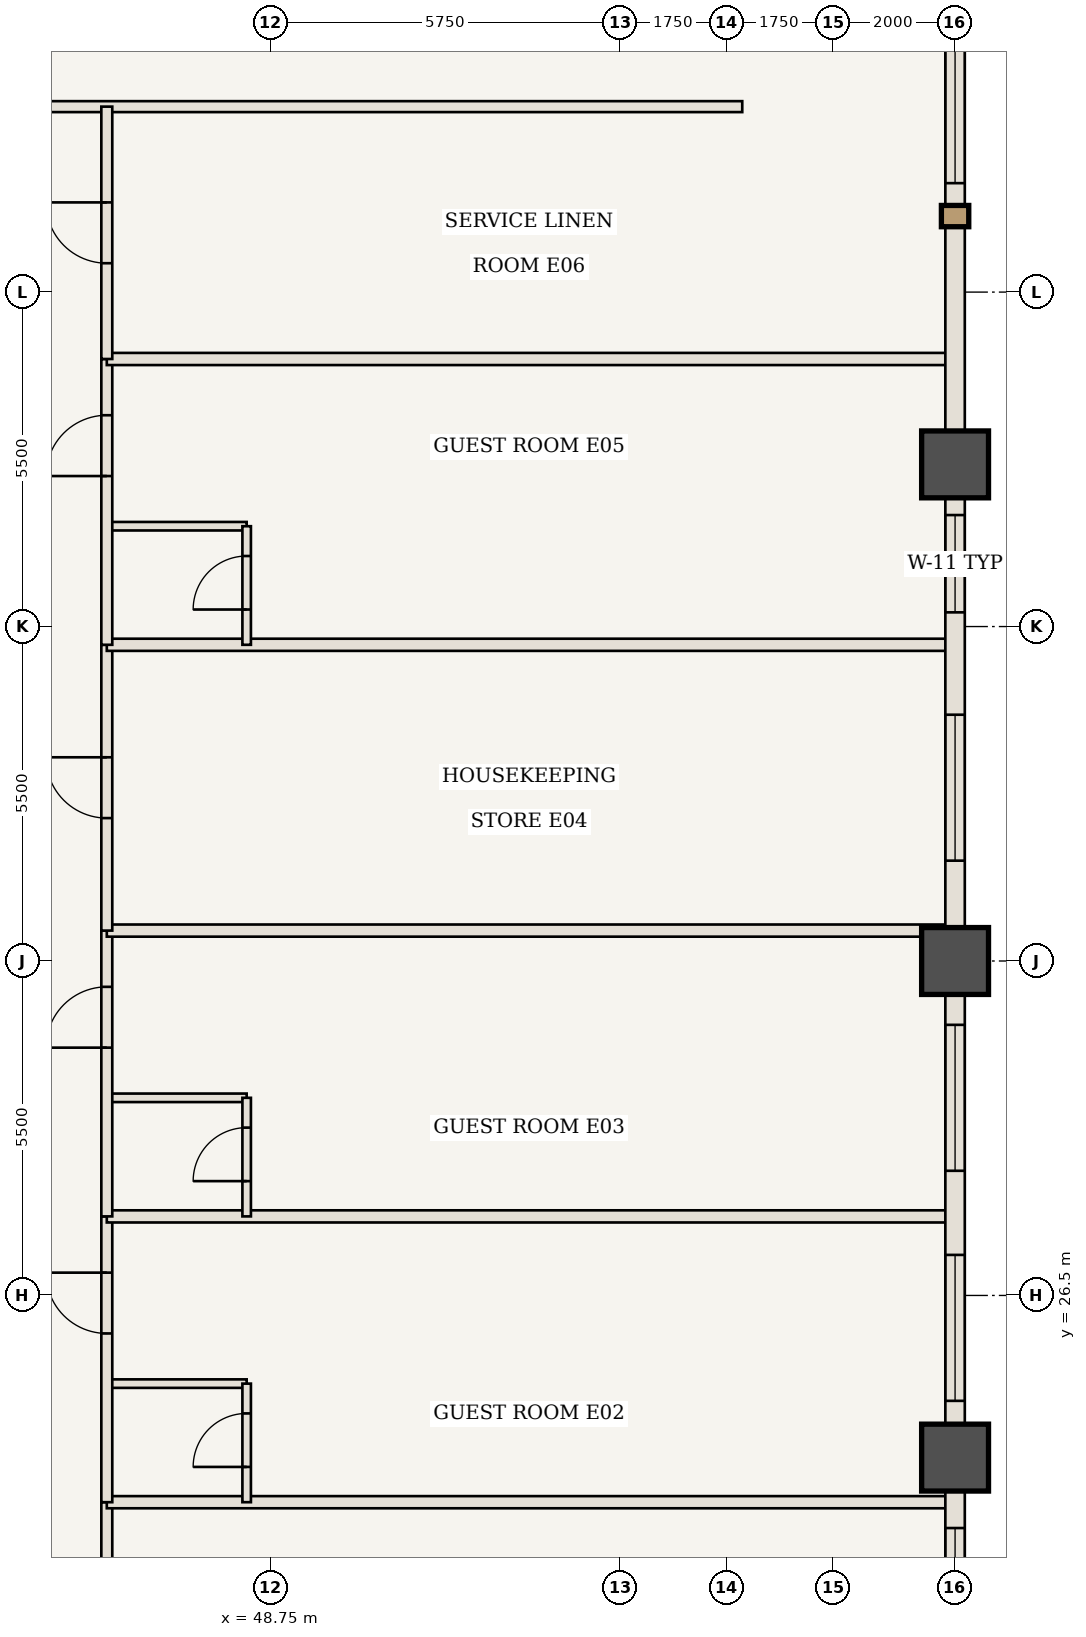
"""IFC4 building model, lengths in metres.
Left out: names, types, materials, properties, quantities, classifications, styles, units other than length and angle.
Written with IfcOpenShell. Run it as: python <this file> out.ifc"""

import sys

from ifc_helpers import new_model, si_unit, direction, frame, frame_2d, origin, origin_2d, place, context, subcontext, project, spatial, rectangle, extrude, element, fill, save


model = new_model("IFC4")
c1 = context("Model", 3, precision=1e-05, world=origin(), true_north=direction((0.0, 1.0)))
c2 = subcontext(c1, "Body", "Model", "MODEL_VIEW")
j1 = project(units=[si_unit("LENGTHUNIT", "METRE"), si_unit("PLANEANGLEUNIT", "RADIAN")], contexts=[c1])
p1 = place(None, origin())
s1 = spatial("IfcSite", under=j1, at=p1, CompositionType="ELEMENT")
p2 = place(p1, origin())
s2 = spatial("IfcBuilding", under=s1, at=p2, CompositionType="ELEMENT")
p3 = place(p2, frame((0.0, 0.0, 73.85)))
s3 = spatial("IfcBuildingStorey", under=s2, at=p3, CompositionType="ELEMENT", Elevation=73.85)
for number, where, z_axis, x_axis in (
    (1, (60.0, 23.833, 0.0), (0.0, 0.0, 1.0), (1.0, 0.0, 0.0)),
    (2, (60.0, 32.0, 0.0), (0.0, 0.0, 1.0), (1.0, 0.0, 0.0)),
    (3, (60.0, 40.167, 0.0), (0.0, 0.0, 1.0), (1.0, 0.0, 0.0)),
):
    element("IfcColumn", number, at=place(p3, frame(where, z_axis=z_axis, x_axis=x_axis)), inside=s3, PredefinedType="COLUMN", context=c2, shape_type="SweptSolid", body=[
        extrude(rectangle(XDim=1.1, YDim=1.1, at=origin_2d()), origin(), (0.0, 0.0, 1.0), 3.5),
    ])
p4 = place(p3, frame((33.8, 46.05, 0.0), z_axis=(0.0, 0.0, 1.0), x_axis=(1.0, 0.0, 0.0)))
e4 = element("IfcWall", 4, at=p4, inside=s3, PredefinedType="STANDARD", context=c2, shape_type="SweptSolid", body=[
    extrude(rectangle(XDim=22.7, YDim=0.18, at=frame_2d((11.35, 0.0))), origin(), (0.0, 0.0, 1.0), 3.24),
])
p5 = place(p4, frame((5.6, 0.0, 0.0)))
e5 = element("IfcOpeningElement", 5, at=p5, cuts=e4, PredefinedType="OPENING", context=c2, shape_type="SweptSolid", body=[
    extrude(rectangle(XDim=1.0, YDim=2.15, at=frame_2d((0.5, 1.075))), frame((0.0, 0.1, 0.0), z_axis=(0.0, -1.0, 0.0), x_axis=(1.0, 0.0, 0.0)), (0.0, 0.0, 1.0), 0.2),
])
p6 = place(p3, frame((46.05, 17.95, 0.0), z_axis=(0.0, 0.0, 1.0), x_axis=(0.0, 1.0, 0.0)))
e6 = element("IfcWall", 6, at=p6, inside=s3, PredefinedType="STANDARD", context=c2, shape_type="SweptSolid", body=[
    extrude(rectangle(XDim=5.15, YDim=0.18, at=frame_2d((2.575, 0.0))), origin(), (0.0, 0.0, 1.0), 3.24),
])
p7 = place(p6, frame((3.0, 0.0, 0.0)))
e7 = element("IfcOpeningElement", 7, at=p7, cuts=e6, PredefinedType="OPENING", context=c2, shape_type="SweptSolid", body=[
    extrude(rectangle(XDim=1.0, YDim=2.15, at=frame_2d((0.5, 1.075))), frame((0.0, 0.1, 0.0), z_axis=(0.0, -1.0, 0.0), x_axis=(1.0, 0.0, 0.0)), (0.0, 0.0, 1.0), 0.2),
])
p8 = place(p3, frame((46.05, 23.1, 0.0), z_axis=(0.0, 0.0, 1.0), x_axis=(1.0, 0.0, 0.0)))
e8 = element("IfcWall", 8, at=p8, inside=s3, PredefinedType="STANDARD", context=c2, shape_type="SweptSolid", body=[
    extrude(rectangle(XDim=13.89, YDim=0.2, at=frame_2d((6.945, 0.0))), origin(), (0.0, 0.0, 1.0), 3.24),
])
p9 = place(p3, frame((46.05, 25.05, 0.0), z_axis=(0.0, 0.0, 1.0), x_axis=(1.0, 0.0, 0.0)))
e9 = element("IfcWall", 9, at=p9, inside=s3, PredefinedType="STANDARD", context=c2, shape_type="SweptSolid", body=[
    extrude(rectangle(XDim=2.3, YDim=0.14, at=frame_2d((1.15, 0.0))), origin(), (0.0, 0.0, 1.0), 3.24),
])
p10 = place(p3, frame((48.35, 23.1, 0.0), z_axis=(0.0, 0.0, 1.0), x_axis=(0.0, 1.0, 0.0)))
e10 = element("IfcWall", 10, at=p10, inside=s3, PredefinedType="STANDARD", context=c2, shape_type="SweptSolid", body=[
    extrude(rectangle(XDim=1.95, YDim=0.14, at=frame_2d((0.975, 0.0))), origin(), (0.0, 0.0, 1.0), 3.24),
])
p11 = place(p10, frame((0.58, 0.0, 0.0)))
e11 = element("IfcOpeningElement", 11, at=p11, cuts=e10, PredefinedType="OPENING", context=c2, shape_type="SweptSolid", body=[
    extrude(rectangle(XDim=0.88, YDim=2.1, at=frame_2d((0.44, 1.05))), frame((0.0, 0.08, 0.0), z_axis=(0.0, -1.0, 0.0), x_axis=(1.0, 0.0, 0.0)), (0.0, 0.0, 1.0), 0.16),
])
p12 = place(p3, frame((46.05, 23.1, 0.0), z_axis=(0.0, 0.0, 1.0), x_axis=(0.0, 1.0, 0.0)))
e12 = element("IfcWall", 12, at=p12, inside=s3, PredefinedType="STANDARD", context=c2, shape_type="SweptSolid", body=[
    extrude(rectangle(XDim=4.7, YDim=0.18, at=frame_2d((2.35, 0.0))), origin(), (0.0, 0.0, 1.0), 3.24),
])
p13 = place(p12, frame((2.775, 0.0, 0.0)))
e13 = element("IfcOpeningElement", 13, at=p13, cuts=e12, PredefinedType="OPENING", context=c2, shape_type="SweptSolid", body=[
    extrude(rectangle(XDim=1.0, YDim=2.15, at=frame_2d((0.5, 1.075))), frame((0.0, 0.1, 0.0), z_axis=(0.0, -1.0, 0.0), x_axis=(1.0, 0.0, 0.0)), (0.0, 0.0, 1.0), 0.2),
])
p14 = place(p3, frame((46.05, 27.8, 0.0), z_axis=(0.0, 0.0, 1.0), x_axis=(1.0, 0.0, 0.0)))
e14 = element("IfcWall", 14, at=p14, inside=s3, PredefinedType="STANDARD", context=c2, shape_type="SweptSolid", body=[
    extrude(rectangle(XDim=13.89, YDim=0.2, at=frame_2d((6.945, 0.0))), origin(), (0.0, 0.0, 1.0), 3.24),
])
p15 = place(p3, frame((46.05, 29.75, 0.0), z_axis=(0.0, 0.0, 1.0), x_axis=(1.0, 0.0, 0.0)))
e15 = element("IfcWall", 15, at=p15, inside=s3, PredefinedType="STANDARD", context=c2, shape_type="SweptSolid", body=[
    extrude(rectangle(XDim=2.3, YDim=0.14, at=frame_2d((1.15, 0.0))), origin(), (0.0, 0.0, 1.0), 3.24),
])
p16 = place(p3, frame((48.35, 27.8, 0.0), z_axis=(0.0, 0.0, 1.0), x_axis=(0.0, 1.0, 0.0)))
e16 = element("IfcWall", 16, at=p16, inside=s3, PredefinedType="STANDARD", context=c2, shape_type="SweptSolid", body=[
    extrude(rectangle(XDim=1.95, YDim=0.14, at=frame_2d((0.975, 0.0))), origin(), (0.0, 0.0, 1.0), 3.24),
])
p17 = place(p16, frame((0.58, 0.0, 0.0)))
e17 = element("IfcOpeningElement", 17, at=p17, cuts=e16, PredefinedType="OPENING", context=c2, shape_type="SweptSolid", body=[
    extrude(rectangle(XDim=0.88, YDim=2.1, at=frame_2d((0.44, 1.05))), frame((0.0, 0.08, 0.0), z_axis=(0.0, -1.0, 0.0), x_axis=(1.0, 0.0, 0.0)), (0.0, 0.0, 1.0), 0.16),
])
p18 = place(p3, frame((46.05, 27.8, 0.0), z_axis=(0.0, 0.0, 1.0), x_axis=(0.0, 1.0, 0.0)))
e18 = element("IfcWall", 18, at=p18, inside=s3, PredefinedType="STANDARD", context=c2, shape_type="SweptSolid", body=[
    extrude(rectangle(XDim=4.7, YDim=0.18, at=frame_2d((2.35, 0.0))), origin(), (0.0, 0.0, 1.0), 3.24),
])
p19 = place(p18, frame((2.775, 0.0, 0.0)))
e19 = element("IfcOpeningElement", 19, at=p19, cuts=e18, PredefinedType="OPENING", context=c2, shape_type="SweptSolid", body=[
    extrude(rectangle(XDim=1.0, YDim=2.15, at=frame_2d((0.5, 1.075))), frame((0.0, 0.1, 0.0), z_axis=(0.0, -1.0, 0.0), x_axis=(1.0, 0.0, 0.0)), (0.0, 0.0, 1.0), 0.2),
])
p20 = place(p3, frame((46.05, 32.5, 0.0), z_axis=(0.0, 0.0, 1.0), x_axis=(1.0, 0.0, 0.0)))
e20 = element("IfcWall", 20, at=p20, inside=s3, PredefinedType="STANDARD", context=c2, shape_type="SweptSolid", body=[
    extrude(rectangle(XDim=13.89, YDim=0.2, at=frame_2d((6.945, 0.0))), origin(), (0.0, 0.0, 1.0), 3.24),
])
p21 = place(p3, frame((46.05, 32.5, 0.0), z_axis=(0.0, 0.0, 1.0), x_axis=(0.0, 1.0, 0.0)))
e21 = element("IfcWall", 21, at=p21, inside=s3, PredefinedType="STANDARD", context=c2, shape_type="SweptSolid", body=[
    extrude(rectangle(XDim=4.7, YDim=0.18, at=frame_2d((2.35, 0.0))), origin(), (0.0, 0.0, 1.0), 3.24),
])
p22 = place(p21, frame((1.85, 0.0, 0.0)))
e22 = element("IfcOpeningElement", 22, at=p22, cuts=e21, PredefinedType="OPENING", context=c2, shape_type="SweptSolid", body=[
    extrude(rectangle(XDim=1.0, YDim=2.15, at=frame_2d((0.5, 1.075))), frame((0.0, 0.1, 0.0), z_axis=(0.0, -1.0, 0.0), x_axis=(1.0, 0.0, 0.0)), (0.0, 0.0, 1.0), 0.2),
])
p23 = place(p3, frame((46.05, 37.2, 0.0), z_axis=(0.0, 0.0, 1.0), x_axis=(1.0, 0.0, 0.0)))
e23 = element("IfcWall", 23, at=p23, inside=s3, PredefinedType="STANDARD", context=c2, shape_type="SweptSolid", body=[
    extrude(rectangle(XDim=13.89, YDim=0.2, at=frame_2d((6.945, 0.0))), origin(), (0.0, 0.0, 1.0), 3.24),
])
p24 = place(p3, frame((46.05, 39.15, 0.0), z_axis=(0.0, 0.0, 1.0), x_axis=(1.0, 0.0, 0.0)))
e24 = element("IfcWall", 24, at=p24, inside=s3, PredefinedType="STANDARD", context=c2, shape_type="SweptSolid", body=[
    extrude(rectangle(XDim=2.3, YDim=0.14, at=frame_2d((1.15, 0.0))), origin(), (0.0, 0.0, 1.0), 3.24),
])
p25 = place(p3, frame((48.35, 37.2, 0.0), z_axis=(0.0, 0.0, 1.0), x_axis=(0.0, 1.0, 0.0)))
e25 = element("IfcWall", 25, at=p25, inside=s3, PredefinedType="STANDARD", context=c2, shape_type="SweptSolid", body=[
    extrude(rectangle(XDim=1.95, YDim=0.14, at=frame_2d((0.975, 0.0))), origin(), (0.0, 0.0, 1.0), 3.24),
])
p26 = place(p25, frame((0.58, 0.0, 0.0)))
e26 = element("IfcOpeningElement", 26, at=p26, cuts=e25, PredefinedType="OPENING", context=c2, shape_type="SweptSolid", body=[
    extrude(rectangle(XDim=0.88, YDim=2.1, at=frame_2d((0.44, 1.05))), frame((0.0, 0.08, 0.0), z_axis=(0.0, -1.0, 0.0), x_axis=(1.0, 0.0, 0.0)), (0.0, 0.0, 1.0), 0.16),
])
p27 = place(p3, frame((46.05, 37.2, 0.0), z_axis=(0.0, 0.0, 1.0), x_axis=(0.0, 1.0, 0.0)))
e27 = element("IfcWall", 27, at=p27, inside=s3, PredefinedType="STANDARD", context=c2, shape_type="SweptSolid", body=[
    extrude(rectangle(XDim=4.7, YDim=0.18, at=frame_2d((2.35, 0.0))), origin(), (0.0, 0.0, 1.0), 3.24),
])
p28 = place(p27, frame((2.775, 0.0, 0.0)))
e28 = element("IfcOpeningElement", 28, at=p28, cuts=e27, PredefinedType="OPENING", context=c2, shape_type="SweptSolid", body=[
    extrude(rectangle(XDim=1.0, YDim=2.15, at=frame_2d((0.5, 1.075))), frame((0.0, 0.1, 0.0), z_axis=(0.0, -1.0, 0.0), x_axis=(1.0, 0.0, 0.0)), (0.0, 0.0, 1.0), 0.2),
])
p29 = place(p3, frame((46.05, 41.9, 0.0), z_axis=(0.0, 0.0, 1.0), x_axis=(1.0, 0.0, 0.0)))
e29 = element("IfcWall", 29, at=p29, inside=s3, PredefinedType="STANDARD", context=c2, shape_type="SweptSolid", body=[
    extrude(rectangle(XDim=13.89, YDim=0.2, at=frame_2d((6.945, 0.0))), origin(), (0.0, 0.0, 1.0), 3.24),
])
p30 = place(p3, frame((46.05, 41.9, 0.0), z_axis=(0.0, 0.0, 1.0), x_axis=(0.0, 1.0, 0.0)))
e30 = element("IfcWall", 30, at=p30, inside=s3, PredefinedType="STANDARD", context=c2, shape_type="SweptSolid", body=[
    extrude(rectangle(XDim=4.15, YDim=0.18, at=frame_2d((2.075, 0.0))), origin(), (0.0, 0.0, 1.0), 3.24),
])
p31 = place(p30, frame((1.575, 0.0, 0.0)))
e31 = element("IfcOpeningElement", 31, at=p31, cuts=e30, PredefinedType="OPENING", context=c2, shape_type="SweptSolid", body=[
    extrude(rectangle(XDim=1.0, YDim=2.15, at=frame_2d((0.5, 1.075))), frame((0.0, 0.1, 0.0), z_axis=(0.0, -1.0, 0.0), x_axis=(1.0, 0.0, 0.0)), (0.0, 0.0, 1.0), 0.2),
])
p32 = place(p3, frame((60.0, 23.833, 0.0), z_axis=(0.0, 0.0, 1.0), x_axis=(0.0, -1.0, 0.0)))
e32 = element("IfcWall", 32, at=p32, inside=s3, PredefinedType="USERDEFINED", context=c2, shape_type="SweptSolid", body=[
    extrude(rectangle(XDim=8.167, YDim=0.32, at=frame_2d((4.083, 0.0))), origin(), (0.0, 0.0, 1.0), 2.44),
])
p33 = place(p32, frame((1.158, 0.0, 0.85)))
e33 = element("IfcOpeningElement", 33, at=p33, cuts=e32, PredefinedType="OPENING", context=c2, shape_type="SweptSolid", body=[
    extrude(rectangle(XDim=2.4, YDim=1.39, at=frame_2d((1.2, 0.695))), frame((0.0, 0.17, 0.0), z_axis=(0.0, -1.0, 0.0), x_axis=(1.0, 0.0, 0.0)), (0.0, 0.0, 1.0), 0.34),
])
p34 = place(p32, frame((4.625, 0.0, 0.85)))
e34 = element("IfcOpeningElement", 34, at=p34, cuts=e32, PredefinedType="OPENING", context=c2, shape_type="SweptSolid", body=[
    extrude(rectangle(XDim=2.8, YDim=1.39, at=frame_2d((1.4, 0.695))), frame((0.0, 0.17, 0.0), z_axis=(0.0, -1.0, 0.0), x_axis=(1.0, 0.0, 0.0)), (0.0, 0.0, 1.0), 0.34),
])
p35 = place(p3, frame((60.0, 32.0, 0.0), z_axis=(0.0, 0.0, 1.0), x_axis=(0.0, -1.0, 0.0)))
e35 = element("IfcWall", 35, at=p35, inside=s3, PredefinedType="USERDEFINED", context=c2, shape_type="SweptSolid", body=[
    extrude(rectangle(XDim=8.167, YDim=0.32, at=frame_2d((4.083, 0.0))), origin(), (0.0, 0.0, 1.0), 2.44),
])
p36 = place(p35, frame((1.05, 0.0, 0.85)))
e36 = element("IfcOpeningElement", 36, at=p36, cuts=e35, PredefinedType="OPENING", context=c2, shape_type="SweptSolid", body=[
    extrude(rectangle(XDim=2.4, YDim=1.39, at=frame_2d((1.2, 0.695))), frame((0.0, 0.17, 0.0), z_axis=(0.0, -1.0, 0.0), x_axis=(1.0, 0.0, 0.0)), (0.0, 0.0, 1.0), 0.34),
])
p37 = place(p35, frame((4.833, 0.0, 0.85)))
e37 = element("IfcOpeningElement", 37, at=p37, cuts=e35, PredefinedType="OPENING", context=c2, shape_type="SweptSolid", body=[
    extrude(rectangle(XDim=2.4, YDim=1.39, at=frame_2d((1.2, 0.695))), frame((0.0, 0.17, 0.0), z_axis=(0.0, -1.0, 0.0), x_axis=(1.0, 0.0, 0.0)), (0.0, 0.0, 1.0), 0.34),
])
p38 = place(p3, frame((60.0, 40.167, 0.0), z_axis=(0.0, 0.0, 1.0), x_axis=(0.0, -1.0, 0.0)))
e38 = element("IfcWall", 38, at=p38, inside=s3, PredefinedType="USERDEFINED", context=c2, shape_type="SweptSolid", body=[
    extrude(rectangle(XDim=8.167, YDim=0.32, at=frame_2d((4.083, 0.0))), origin(), (0.0, 0.0, 1.0), 2.44),
])
p39 = place(p38, frame((0.833, 0.0, 0.85)))
e39 = element("IfcOpeningElement", 39, at=p39, cuts=e38, PredefinedType="OPENING", context=c2, shape_type="SweptSolid", body=[
    extrude(rectangle(XDim=1.6, YDim=1.39, at=frame_2d((0.8, 0.695))), frame((0.0, 0.17, 0.0), z_axis=(0.0, -1.0, 0.0), x_axis=(1.0, 0.0, 0.0)), (0.0, 0.0, 1.0), 0.34),
])
p40 = place(p38, frame((4.117, 0.0, 0.85)))
e40 = element("IfcOpeningElement", 40, at=p40, cuts=e38, PredefinedType="OPENING", context=c2, shape_type="SweptSolid", body=[
    extrude(rectangle(XDim=2.4, YDim=1.39, at=frame_2d((1.2, 0.695))), frame((0.0, 0.17, 0.0), z_axis=(0.0, -1.0, 0.0), x_axis=(1.0, 0.0, 0.0)), (0.0, 0.0, 1.0), 0.34),
])
p41 = place(p3, frame((60.0, 48.333, 0.0), z_axis=(0.0, 0.0, 1.0), x_axis=(0.0, -1.0, 0.0)))
e41 = element("IfcWall", 41, at=p41, inside=s3, PredefinedType="USERDEFINED", context=c2, shape_type="SweptSolid", body=[
    extrude(rectangle(XDim=8.167, YDim=0.32, at=frame_2d((4.083, 0.0))), origin(), (0.0, 0.0, 1.0), 2.44),
])
p42 = place(p41, frame((0.742, 0.0, 0.85)))
e42 = element("IfcOpeningElement", 42, at=p42, cuts=e41, PredefinedType="OPENING", context=c2, shape_type="SweptSolid", body=[
    extrude(rectangle(XDim=2.8, YDim=1.39, at=frame_2d((1.4, 0.695))), frame((0.0, 0.17, 0.0), z_axis=(0.0, -1.0, 0.0), x_axis=(1.0, 0.0, 0.0)), (0.0, 0.0, 1.0), 0.34),
])
p43 = place(p11, origin())
e43 = element("IfcDoor", 43, at=p43, inside=s3, OperationType="SINGLE_SWING_LEFT", PredefinedType="DOOR", context=c2, shape_type="SweptSolid", body=[
    extrude(rectangle(XDim=0.88, YDim=2.1, at=frame_2d((0.44, 1.05))), frame((0.0, 0.025, 0.0), z_axis=(0.0, -1.0, 0.0), x_axis=(1.0, 0.0, 0.0)), (0.0, 0.0, 1.0), 0.05),
])
fill(e11, e43)
p44 = place(p13, origin())
e44 = element("IfcDoor", 44, at=p44, inside=s3, OperationType="SINGLE_SWING_RIGHT", PredefinedType="DOOR", context=c2, shape_type="SweptSolid", body=[
    extrude(rectangle(XDim=1.0, YDim=2.15, at=frame_2d((0.5, 1.075))), frame((0.0, 0.025, 0.0), z_axis=(0.0, -1.0, 0.0), x_axis=(1.0, 0.0, 0.0)), (0.0, 0.0, 1.0), 0.05),
])
fill(e13, e44)
p45 = place(p17, origin())
e45 = element("IfcDoor", 45, at=p45, inside=s3, OperationType="SINGLE_SWING_LEFT", PredefinedType="DOOR", context=c2, shape_type="SweptSolid", body=[
    extrude(rectangle(XDim=0.88, YDim=2.1, at=frame_2d((0.44, 1.05))), frame((0.0, 0.025, 0.0), z_axis=(0.0, -1.0, 0.0), x_axis=(1.0, 0.0, 0.0)), (0.0, 0.0, 1.0), 0.05),
])
fill(e17, e45)
p46 = place(p19, origin())
e46 = element("IfcDoor", 46, at=p46, inside=s3, OperationType="SINGLE_SWING_LEFT", PredefinedType="DOOR", context=c2, shape_type="SweptSolid", body=[
    extrude(rectangle(XDim=1.0, YDim=2.15, at=frame_2d((0.5, 1.075))), frame((0.0, 0.025, 0.0), z_axis=(0.0, -1.0, 0.0), x_axis=(1.0, 0.0, 0.0)), (0.0, 0.0, 1.0), 0.05),
])
fill(e19, e46)
p47 = place(p22, origin())
e47 = element("IfcDoor", 47, at=p47, inside=s3, OperationType="SINGLE_SWING_RIGHT", PredefinedType="DOOR", context=c2, shape_type="SweptSolid", body=[
    extrude(rectangle(XDim=1.0, YDim=2.15, at=frame_2d((0.5, 1.075))), frame((0.0, 0.025, 0.0), z_axis=(0.0, -1.0, 0.0), x_axis=(1.0, 0.0, 0.0)), (0.0, 0.0, 1.0), 0.05),
])
fill(e22, e47)
p48 = place(p26, origin())
e48 = element("IfcDoor", 48, at=p48, inside=s3, OperationType="SINGLE_SWING_LEFT", PredefinedType="DOOR", context=c2, shape_type="SweptSolid", body=[
    extrude(rectangle(XDim=0.88, YDim=2.1, at=frame_2d((0.44, 1.05))), frame((0.0, 0.025, 0.0), z_axis=(0.0, -1.0, 0.0), x_axis=(1.0, 0.0, 0.0)), (0.0, 0.0, 1.0), 0.05),
])
fill(e26, e48)
p49 = place(p28, origin())
e49 = element("IfcDoor", 49, at=p49, inside=s3, OperationType="SINGLE_SWING_LEFT", PredefinedType="DOOR", context=c2, shape_type="SweptSolid", body=[
    extrude(rectangle(XDim=1.0, YDim=2.15, at=frame_2d((0.5, 1.075))), frame((0.0, 0.025, 0.0), z_axis=(0.0, -1.0, 0.0), x_axis=(1.0, 0.0, 0.0)), (0.0, 0.0, 1.0), 0.05),
])
fill(e28, e49)
p50 = place(p31, origin())
e50 = element("IfcDoor", 50, at=p50, inside=s3, OperationType="SINGLE_SWING_RIGHT", PredefinedType="DOOR", context=c2, shape_type="SweptSolid", body=[
    extrude(rectangle(XDim=1.0, YDim=2.15, at=frame_2d((0.5, 1.075))), frame((0.0, 0.025, 0.0), z_axis=(0.0, -1.0, 0.0), x_axis=(1.0, 0.0, 0.0)), (0.0, 0.0, 1.0), 0.05),
])
fill(e31, e50)
p51 = place(p33, origin())
e51 = element("IfcWindow", 51, at=p51, inside=s3, PartitioningType="SINGLE_PANEL", PredefinedType="WINDOW", context=c2, shape_type="SweptSolid", body=[
    extrude(rectangle(XDim=2.4, YDim=1.39, at=frame_2d((1.2, 0.695))), frame((0.0, 0.03, 0.0), z_axis=(0.0, -1.0, 0.0), x_axis=(1.0, 0.0, 0.0)), (0.0, 0.0, 1.0), 0.06),
])
fill(e33, e51)
p52 = place(p36, origin())
e52 = element("IfcWindow", 52, at=p52, inside=s3, PartitioningType="SINGLE_PANEL", PredefinedType="WINDOW", context=c2, shape_type="SweptSolid", body=[
    extrude(rectangle(XDim=2.4, YDim=1.39, at=frame_2d((1.2, 0.695))), frame((0.0, 0.03, 0.0), z_axis=(0.0, -1.0, 0.0), x_axis=(1.0, 0.0, 0.0)), (0.0, 0.0, 1.0), 0.06),
])
fill(e36, e52)
p53 = place(p37, origin())
e53 = element("IfcWindow", 53, at=p53, inside=s3, PartitioningType="SINGLE_PANEL", PredefinedType="WINDOW", context=c2, shape_type="SweptSolid", body=[
    extrude(rectangle(XDim=2.4, YDim=1.39, at=frame_2d((1.2, 0.695))), frame((0.0, 0.03, 0.0), z_axis=(0.0, -1.0, 0.0), x_axis=(1.0, 0.0, 0.0)), (0.0, 0.0, 1.0), 0.06),
])
fill(e37, e53)
p54 = place(p39, origin())
e54 = element("IfcWindow", 54, at=p54, inside=s3, PartitioningType="SINGLE_PANEL", PredefinedType="WINDOW", context=c2, shape_type="SweptSolid", body=[
    extrude(rectangle(XDim=1.6, YDim=1.39, at=frame_2d((0.8, 0.695))), frame((0.0, 0.03, 0.0), z_axis=(0.0, -1.0, 0.0), x_axis=(1.0, 0.0, 0.0)), (0.0, 0.0, 1.0), 0.06),
])
fill(e39, e54)
p55 = place(p40, origin())
e55 = element("IfcWindow", 55, at=p55, inside=s3, PartitioningType="SINGLE_PANEL", PredefinedType="WINDOW", context=c2, shape_type="SweptSolid", body=[
    extrude(rectangle(XDim=2.4, YDim=1.39, at=frame_2d((1.2, 0.695))), frame((0.0, 0.03, 0.0), z_axis=(0.0, -1.0, 0.0), x_axis=(1.0, 0.0, 0.0)), (0.0, 0.0, 1.0), 0.06),
])
fill(e40, e55)
p56 = place(p42, origin())
e56 = element("IfcWindow", 56, at=p56, inside=s3, PartitioningType="SINGLE_PANEL", PredefinedType="WINDOW", context=c2, shape_type="SweptSolid", body=[
    extrude(rectangle(XDim=2.8, YDim=1.39, at=frame_2d((1.4, 0.695))), frame((0.0, 0.03, 0.0), z_axis=(0.0, -1.0, 0.0), x_axis=(1.0, 0.0, 0.0)), (0.0, 0.0, 1.0), 0.06),
])
fill(e42, e56)
save(model, sys.argv[1])
